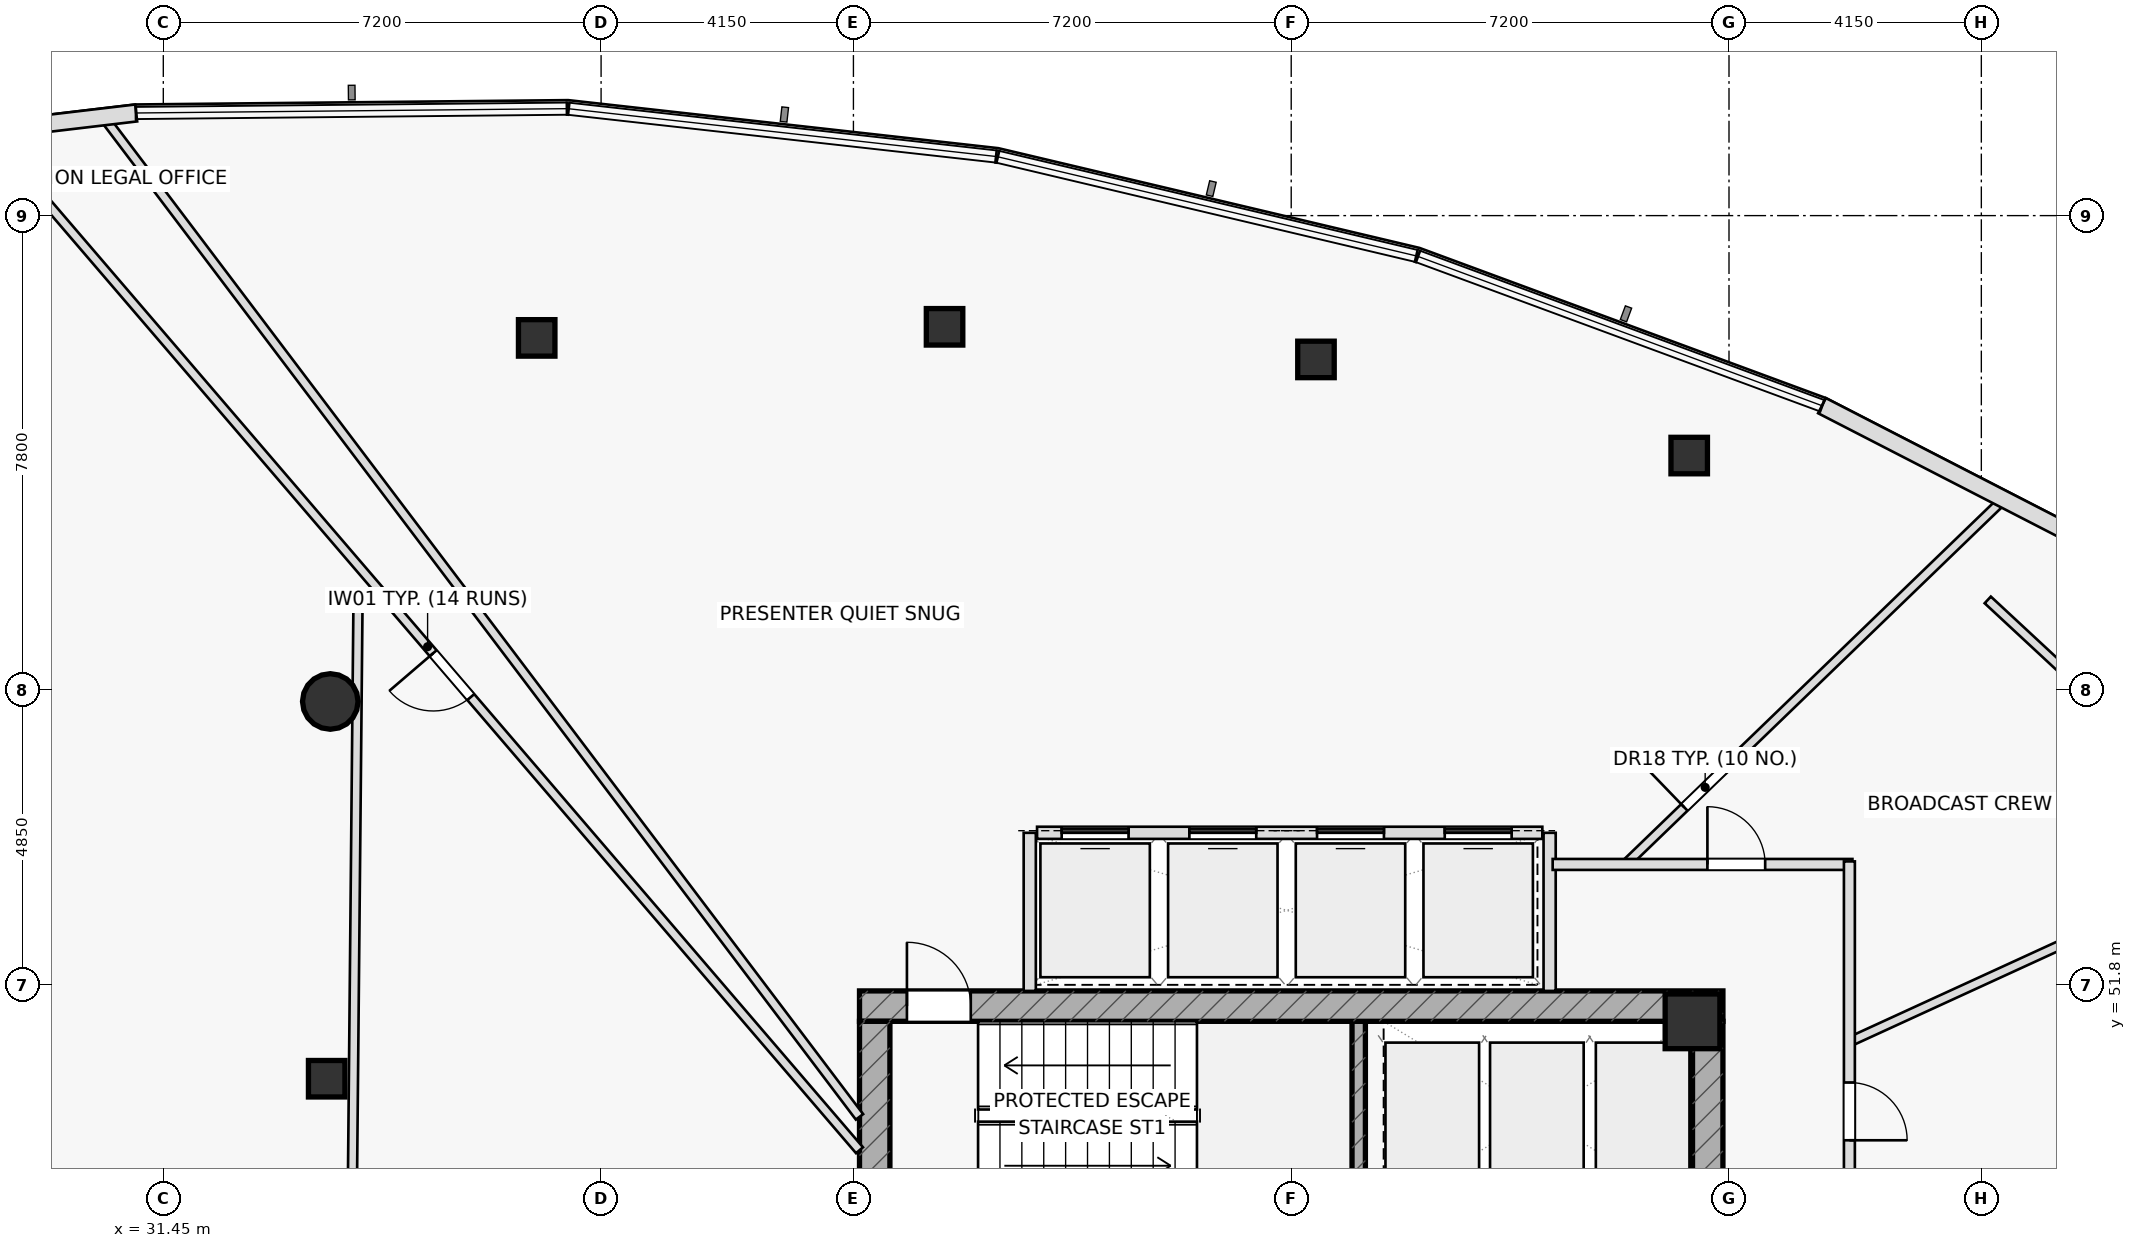
"""IFC4 building model, lengths in metres.
Left out: names, types, materials, properties, quantities, classifications, styles, units other than length and angle.
Written with IfcOpenShell. Run it as: python <this file> out.ifc"""

import sys

from ifc_helpers import new_model, si_unit, direction, frame, frame_2d, origin, origin_2d, place, context, subcontext, project, spatial, rectangle, hollow_rectangle, hollow_circle, extrude, element, fill, save


model = new_model("IFC4")
c1 = context("Model", 3, precision=1e-05, world=origin(), true_north=direction((0.0, 1.0)))
c2 = subcontext(c1, "Body", "Model", "MODEL_VIEW")
j1 = project(units=[si_unit("LENGTHUNIT", "METRE"), si_unit("PLANEANGLEUNIT", "RADIAN")], contexts=[c1])
p1 = place(None, origin())
s1 = spatial("IfcSite", under=j1, at=p1, CompositionType="ELEMENT")
p2 = place(p1, origin())
s2 = spatial("IfcBuilding", under=s1, at=p2, CompositionType="ELEMENT")
p3 = place(p2, frame((0.0, 0.0, 222.15)))
s3 = spatial("IfcBuildingStorey", under=s2, at=p3, CompositionType="ELEMENT", Elevation=222.15)
p4 = place(p3, frame((51.11, 48.1, 0.0), z_axis=(0.0, 0.0, 1.0), x_axis=(0.0, 1.0, 0.0)))
e1 = element("IfcWall", 1, at=p4, inside=s3, PredefinedType="SHEAR", context=c2, shape_type="SweptSolid", body=[
    extrude(rectangle(XDim=3.1, YDim=0.22, at=frame_2d((1.55, 0.0))), origin(), (0.0, 0.0, 1.0), 3.65),
])
p5 = place(p3, frame((42.9, 51.45, 0.0), z_axis=(0.0, 0.0, 1.0), x_axis=(1.0, 0.0, 0.0)))
e2 = element("IfcWall", 2, at=p5, inside=s3, PredefinedType="SHEAR", context=c2, shape_type="SweptSolid", body=[
    extrude(rectangle(XDim=14.2, YDim=0.5, at=frame_2d((7.1, 0.0))), origin(), (0.0, 0.0, 1.0), 3.65),
])
p6 = place(p5, frame((0.78, 0.0, 0.0)))
e3 = element("IfcOpeningElement", 3, at=p6, cuts=e2, PredefinedType="OPENING", context=c2, shape_type="SweptSolid", body=[
    extrude(rectangle(XDim=1.05, YDim=2.2, at=frame_2d((0.525, 1.1))), frame((0.0, 0.26, 0.0), z_axis=(0.0, -1.0, 0.0), x_axis=(1.0, 0.0, 0.0)), (0.0, 0.0, 1.0), 0.52),
])
p7 = place(p3, frame((43.15, 38.8, 0.0), z_axis=(0.0, 0.0, 1.0), x_axis=(0.0, 1.0, 0.0)))
e4 = element("IfcWall", 4, at=p7, inside=s3, PredefinedType="SHEAR", context=c2, shape_type="SweptSolid", body=[
    extrude(rectangle(XDim=12.4, YDim=0.5, at=frame_2d((6.2, 0.0))), origin(), (0.0, 0.0, 1.0), 3.65),
])
p8 = place(p3, frame((56.85, 38.8, 0.0), z_axis=(0.0, 0.0, 1.0), x_axis=(0.0, 1.0, 0.0)))
e5 = element("IfcWall", 5, at=p8, inside=s3, PredefinedType="SHEAR", context=c2, shape_type="SweptSolid", body=[
    extrude(rectangle(XDim=12.4, YDim=0.5, at=frame_2d((6.2, 0.0))), origin(), (0.0, 0.0, 1.0), 3.65),
])
p9 = place(p8, frame((3.85, 0.0, 0.0)))
e6 = element("IfcOpeningElement", 6, at=p9, cuts=e5, PredefinedType="OPENING", context=c2, shape_type="SweptSolid", body=[
    extrude(rectangle(XDim=1.5, YDim=2.2, at=frame_2d((0.75, 1.1))), frame((0.0, 0.26, 0.0), z_axis=(0.0, -1.0, 0.0), x_axis=(1.0, 0.0, 0.0)), (0.0, 0.0, 1.0), 0.52),
])
p10 = place(p3, frame((56.6, 51.2, 0.0), z_axis=(0.0, 0.0, 1.0), x_axis=(1.0, 0.0, 0.0)))
e7 = element("IfcColumn", 7, at=p10, inside=s3, PredefinedType="COLUMN", context=c2, shape_type="SweptSolid", body=[
    extrude(rectangle(XDim=0.9, YDim=0.9, at=origin_2d()), origin(), (0.0, 0.0, 1.0), 3.65),
])
p11 = place(p3, frame((34.196, 56.46, 0.0), z_axis=(0.0, 0.0, 1.0), x_axis=(1.0, 0.0, 0.0)))
e8 = element("IfcColumn", 8, at=p11, inside=s3, PredefinedType="COLUMN", context=c2, shape_type="SweptSolid", body=[
    extrude(hollow_circle(Radius=0.457, WallThickness=0.04, at=origin_2d()), origin(), (0.0, 0.0, 1.0), 3.65),
])
for number, where, z_axis, x_axis in (
    (9, (34.137, 50.256, 0.0), (0.0, 0.0, 1.0), (1.0, 0.0, 0.0)),
    (10, (56.546, 60.504, 0.0), (0.0, 0.0, 1.0), (1.0, 0.0, 0.0)),
    (11, (50.407, 62.085, 0.0), (0.0, 0.0, 1.0), (1.0, 0.0, 0.0)),
    (12, (44.299, 62.621, 0.0), (0.0, 0.0, 1.0), (1.0, 0.0, 0.0)),
    (13, (37.591, 62.439, 0.0), (0.0, 0.0, 1.0), (1.0, 0.0, 0.0)),
):
    element("IfcColumn", number, at=place(p3, frame(where, z_axis=z_axis, x_axis=x_axis)), inside=s3, PredefinedType="COLUMN", context=c2, shape_type="SweptSolid", body=[
        extrude(hollow_rectangle(XDim=0.6, YDim=0.6, WallThickness=0.036, at=origin_2d()), origin(), (0.0, 0.0, 1.0), 3.65),
    ])
for number, where, z_axis, x_axis in (
    (14, (45.7, 51.7, 0.0), (0.0, 0.0, 1.0), (0.0, 1.0, 0.0)),
    (15, (54.25, 51.7, 0.0), (0.0, 0.0, 1.0), (0.0, 1.0, 0.0)),
):
    element("IfcWall", number, at=place(p3, frame(where, z_axis=z_axis, x_axis=x_axis)), inside=s3, PredefinedType="PARTITIONING", context=c2, shape_type="SweptSolid", body=[
        extrude(rectangle(XDim=2.6, YDim=0.2, at=frame_2d((1.3, 0.0))), origin(), (0.0, 0.0, 1.0), 3.65),
    ])
p12 = place(p3, frame((34.652, 58.056, 0.0), z_axis=(0.0, 0.0, 1.0), x_axis=(-0.009553538759, -0.999954363907, 0.0)))
e16 = element("IfcWall", 16, at=p12, inside=s3, PredefinedType="PARTITIONING", context=c2, shape_type="SweptSolid", body=[
    extrude(rectangle(XDim=9.404, YDim=0.15, at=frame_2d((4.702, 0.0))), origin(), (0.0, 0.0, 1.0), 3.135),
])
p13 = place(p3, frame((69.792, 50.388, 0.0), z_axis=(0.0, 0.0, 1.0), x_axis=(-0.732769799181, 0.680476613418, 0.0)))
e17 = element("IfcWall", 17, at=p13, inside=s3, PredefinedType="PARTITIONING", context=c2, shape_type="SweptSolid", body=[
    extrude(rectangle(XDim=11.378, YDim=0.15, at=frame_2d((5.689, 0.0))), origin(), (0.0, 0.0, 1.0), 3.025),
])
p14 = place(p3, frame((59.18, 50.862, 0.0), z_axis=(0.0, 0.0, 1.0), x_axis=(0.908933957831, 0.416940115966, 0.0)))
e18 = element("IfcWall", 18, at=p14, inside=s3, PredefinedType="PARTITIONING", context=c2, shape_type="SweptSolid", body=[
    extrude(rectangle(XDim=10.839, YDim=0.15, at=frame_2d((5.419, 0.0))), origin(), (0.0, 0.0, 1.0), 3.025),
])
p15 = place(p3, frame((55.495, 53.78, 0.0), z_axis=(0.0, 0.0, 1.0), x_axis=(0.719458295386, 0.694535644298, 0.0)))
e19 = element("IfcWall", 19, at=p15, inside=s3, PredefinedType="PARTITIONING", context=c2, shape_type="SweptSolid", body=[
    extrude(rectangle(XDim=8.66, YDim=0.15, at=frame_2d((4.33, 0.0))), origin(), (0.0, 0.0, 1.0), 3.025),
])
p16 = place(p15, frame((1.35, 0.0, 0.0)))
e20 = element("IfcOpeningElement", 20, at=p16, cuts=e19, PredefinedType="OPENING", context=c2, shape_type="SweptSolid", body=[
    extrude(rectangle(XDim=0.95, YDim=2.05, at=frame_2d((0.475, 1.025))), frame((0.0, 0.085, 0.0), z_axis=(0.0, -1.0, 0.0), x_axis=(1.0, 0.0, 0.0)), (0.0, 0.0, 1.0), 0.17),
])
p17 = place(p3, frame((42.9, 49.629, 0.0), z_axis=(0.0, 0.0, 1.0), x_axis=(-0.603127375297, 0.797644889138, 0.0)))
e21 = element("IfcWall", 21, at=p17, inside=s3, PredefinedType="PARTITIONING", context=c2, shape_type="SweptSolid", body=[
    extrude(rectangle(XDim=20.629, YDim=0.15, at=frame_2d((10.314, 0.0))), origin(), (0.0, 0.0, 1.0), 3.025),
])
p18 = place(p3, frame((42.9, 49.08, 0.0), z_axis=(0.0, 0.0, 1.0), x_axis=(-0.651097245438, 0.758994319467, 0.0)))
e22 = element("IfcWall", 22, at=p18, inside=s3, PredefinedType="PARTITIONING", context=c2, shape_type="SweptSolid", body=[
    extrude(rectangle(XDim=21.819, YDim=0.15, at=frame_2d((10.91, 0.0))), origin(), (0.0, 0.0, 1.0), 3.025),
])
p19 = place(p18, frame((9.819, 0.0, 0.0)))
e23 = element("IfcOpeningElement", 23, at=p19, cuts=e22, PredefinedType="OPENING", context=c2, shape_type="SweptSolid", body=[
    extrude(rectangle(XDim=0.95, YDim=2.05, at=frame_2d((0.475, 1.025))), frame((0.0, 0.085, 0.0), z_axis=(0.0, -1.0, 0.0), x_axis=(1.0, 0.0, 0.0)), (0.0, 0.0, 1.0), 0.17),
])
p20 = place(p3, frame((54.3, 53.78, 0.0), z_axis=(0.0, 0.0, 1.0), x_axis=(1.0, 0.0, 0.0)))
e24 = element("IfcWall", 24, at=p20, inside=s3, PredefinedType="PARTITIONING", context=c2, shape_type="SweptSolid", body=[
    extrude(rectangle(XDim=4.93, YDim=0.18, at=frame_2d((2.465, 0.0))), origin(), (0.0, 0.0, 1.0), 3.65),
])
p21 = place(p20, frame((2.545, 0.0, 0.0)))
e25 = element("IfcOpeningElement", 25, at=p21, cuts=e24, PredefinedType="OPENING", context=c2, shape_type="SweptSolid", body=[
    extrude(rectangle(XDim=0.95, YDim=2.05, at=frame_2d((0.475, 1.025))), frame((0.0, 0.1, 0.0), z_axis=(0.0, -1.0, 0.0), x_axis=(1.0, 0.0, 0.0)), (0.0, 0.0, 1.0), 0.2),
])
p22 = place(p3, frame((59.18, 53.83, 0.0), z_axis=(0.0, 0.0, 1.0), x_axis=(0.0, -1.0, 0.0)))
e26 = element("IfcWall", 26, at=p22, inside=s3, PredefinedType="PARTITIONING", context=c2, shape_type="SweptSolid", body=[
    extrude(rectangle(XDim=5.53, YDim=0.18, at=frame_2d((2.765, 0.0))), origin(), (0.0, 0.0, 1.0), 3.65),
])
p23 = place(p22, frame((3.636, 0.0, 0.0)))
e27 = element("IfcOpeningElement", 27, at=p23, cuts=e26, PredefinedType="OPENING", context=c2, shape_type="SweptSolid", body=[
    extrude(rectangle(XDim=0.95, YDim=2.05, at=frame_2d((0.475, 1.025))), frame((0.0, 0.1, 0.0), z_axis=(0.0, -1.0, 0.0), x_axis=(1.0, 0.0, 0.0)), (0.0, 0.0, 1.0), 0.2),
])
p24 = place(p3, frame((31.004, 66.138, 0.0), z_axis=(0.0, 0.0, 1.0), x_axis=(-0.993058488842, -0.117621587046, 0.0)))
e28 = element("IfcWall", 28, at=p24, inside=s3, PredefinedType="STANDARD", context=c2, shape_type="SweptSolid", body=[
    extrude(rectangle(XDim=1.852, YDim=0.28, at=frame_2d((0.926, 0.0))), origin(), (0.0, 0.0, 1.0), 3.65),
])
p25 = place(p3, frame((65.061, 58.067, 0.0), z_axis=(0.0, 0.0, 1.0), x_axis=(-0.889204120168, 0.457510691325, 0.0)))
e29 = element("IfcWall", 29, at=p25, inside=s3, PredefinedType="STANDARD", context=c2, shape_type="SweptSolid", body=[
    extrude(rectangle(XDim=7.121, YDim=0.28, at=frame_2d((3.561, 0.0))), origin(), (0.0, 0.0, 1.0), 3.65),
])
p26 = place(p3, frame((45.82, 54.3, 0.0), z_axis=(0.0, 0.0, 1.0), x_axis=(1.0, 0.0, 0.0)))
e30 = element("IfcWall", 30, at=p26, inside=s3, PredefinedType="PARTITIONING", context=c2, shape_type="SweptSolid", body=[
    extrude(rectangle(XDim=8.31, YDim=0.2, at=frame_2d((4.155, 0.0))), origin(), (0.0, 0.0, 1.0), 3.65),
])
p27 = place(p26, frame((0.405, 0.0, 0.0)))
e31 = element("IfcOpeningElement", 31, at=p27, cuts=e30, PredefinedType="OPENING", context=c2, shape_type="SweptSolid", body=[
    extrude(rectangle(XDim=1.1, YDim=2.15, at=frame_2d((0.55, 1.075))), frame((0.0, 0.11, 0.0), z_axis=(0.0, -1.0, 0.0), x_axis=(1.0, 0.0, 0.0)), (0.0, 0.0, 1.0), 0.22),
])
p28 = place(p26, frame((2.505, 0.0, 0.0)))
e32 = element("IfcOpeningElement", 32, at=p28, cuts=e30, PredefinedType="OPENING", context=c2, shape_type="SweptSolid", body=[
    extrude(rectangle(XDim=1.1, YDim=2.15, at=frame_2d((0.55, 1.075))), frame((0.0, 0.11, 0.0), z_axis=(0.0, -1.0, 0.0), x_axis=(1.0, 0.0, 0.0)), (0.0, 0.0, 1.0), 0.22),
])
p29 = place(p26, frame((4.605, 0.0, 0.0)))
e33 = element("IfcOpeningElement", 33, at=p29, cuts=e30, PredefinedType="OPENING", context=c2, shape_type="SweptSolid", body=[
    extrude(rectangle(XDim=1.1, YDim=2.15, at=frame_2d((0.55, 1.075))), frame((0.0, 0.11, 0.0), z_axis=(0.0, -1.0, 0.0), x_axis=(1.0, 0.0, 0.0)), (0.0, 0.0, 1.0), 0.22),
])
p30 = place(p26, frame((6.705, 0.0, 0.0)))
e34 = element("IfcOpeningElement", 34, at=p30, cuts=e30, PredefinedType="OPENING", context=c2, shape_type="SweptSolid", body=[
    extrude(rectangle(XDim=1.1, YDim=2.15, at=frame_2d((0.55, 1.075))), frame((0.0, 0.11, 0.0), z_axis=(0.0, -1.0, 0.0), x_axis=(1.0, 0.0, 0.0)), (0.0, 0.0, 1.0), 0.22),
])
p31 = place(p6, origin())
e35 = element("IfcDoor", 35, at=p31, inside=s3, OperationType="SINGLE_SWING_LEFT", PredefinedType="DOOR", context=c2, shape_type="SweptSolid", body=[
    extrude(rectangle(XDim=1.05, YDim=2.2, at=frame_2d((0.525, 1.1))), frame((0.0, 0.025, 0.0), z_axis=(0.0, -1.0, 0.0), x_axis=(1.0, 0.0, 0.0)), (0.0, 0.0, 1.0), 0.05),
])
fill(e3, e35)
p32 = place(p16, origin())
e36 = element("IfcDoor", 36, at=p32, inside=s3, OperationType="SINGLE_SWING_LEFT", PredefinedType="DOOR", context=c2, shape_type="SweptSolid", body=[
    extrude(rectangle(XDim=0.95, YDim=2.05, at=frame_2d((0.475, 1.025))), frame((0.0, 0.025, 0.0), z_axis=(0.0, -1.0, 0.0), x_axis=(1.0, 0.0, 0.0)), (0.0, 0.0, 1.0), 0.05),
])
fill(e20, e36)
p33 = place(p19, origin())
e37 = element("IfcDoor", 37, at=p33, inside=s3, OperationType="SINGLE_SWING_RIGHT", PredefinedType="DOOR", context=c2, shape_type="SweptSolid", body=[
    extrude(rectangle(XDim=0.95, YDim=2.05, at=frame_2d((0.475, 1.025))), frame((0.0, 0.025, 0.0), z_axis=(0.0, -1.0, 0.0), x_axis=(1.0, 0.0, 0.0)), (0.0, 0.0, 1.0), 0.05),
])
fill(e23, e37)
p34 = place(p21, origin())
e38 = element("IfcDoor", 38, at=p34, inside=s3, OperationType="SINGLE_SWING_LEFT", PredefinedType="DOOR", context=c2, shape_type="SweptSolid", body=[
    extrude(rectangle(XDim=0.95, YDim=2.05, at=frame_2d((0.475, 1.025))), frame((0.0, 0.025, 0.0), z_axis=(0.0, -1.0, 0.0), x_axis=(1.0, 0.0, 0.0)), (0.0, 0.0, 1.0), 0.05),
])
fill(e25, e38)
p35 = place(p23, origin())
e39 = element("IfcDoor", 39, at=p35, inside=s3, OperationType="SINGLE_SWING_RIGHT", PredefinedType="DOOR", context=c2, shape_type="SweptSolid", body=[
    extrude(rectangle(XDim=0.95, YDim=2.05, at=frame_2d((0.475, 1.025))), frame((0.0, 0.025, 0.0), z_axis=(0.0, -1.0, 0.0), x_axis=(1.0, 0.0, 0.0)), (0.0, 0.0, 1.0), 0.05),
])
fill(e27, e39)
p36 = place(p27, origin())
e40 = element("IfcDoor", 40, at=p36, inside=s3, OperationType="SLIDING_TO_LEFT", PredefinedType="DOOR", context=c2, shape_type="SweptSolid", body=[
    extrude(rectangle(XDim=1.1, YDim=2.15, at=frame_2d((0.55, 1.075))), frame((0.0, 0.025, 0.0), z_axis=(0.0, -1.0, 0.0), x_axis=(1.0, 0.0, 0.0)), (0.0, 0.0, 1.0), 0.05),
])
fill(e31, e40)
p37 = place(p28, origin())
e41 = element("IfcDoor", 41, at=p37, inside=s3, OperationType="SLIDING_TO_RIGHT", PredefinedType="DOOR", context=c2, shape_type="SweptSolid", body=[
    extrude(rectangle(XDim=1.1, YDim=2.15, at=frame_2d((0.55, 1.075))), frame((0.0, 0.025, 0.0), z_axis=(0.0, -1.0, 0.0), x_axis=(1.0, 0.0, 0.0)), (0.0, 0.0, 1.0), 0.05),
])
fill(e32, e41)
p38 = place(p29, origin())
e42 = element("IfcDoor", 42, at=p38, inside=s3, OperationType="SLIDING_TO_LEFT", PredefinedType="DOOR", context=c2, shape_type="SweptSolid", body=[
    extrude(rectangle(XDim=1.1, YDim=2.15, at=frame_2d((0.55, 1.075))), frame((0.0, 0.025, 0.0), z_axis=(0.0, -1.0, 0.0), x_axis=(1.0, 0.0, 0.0)), (0.0, 0.0, 1.0), 0.05),
])
fill(e33, e42)
p39 = place(p30, origin())
e43 = element("IfcDoor", 43, at=p39, inside=s3, OperationType="SLIDING_TO_RIGHT", PredefinedType="DOOR", context=c2, shape_type="SweptSolid", body=[
    extrude(rectangle(XDim=1.1, YDim=2.15, at=frame_2d((0.55, 1.075))), frame((0.0, 0.025, 0.0), z_axis=(0.0, -1.0, 0.0), x_axis=(1.0, 0.0, 0.0)), (0.0, 0.0, 1.0), 0.05),
])
fill(e34, e43)
save(model, sys.argv[1])
